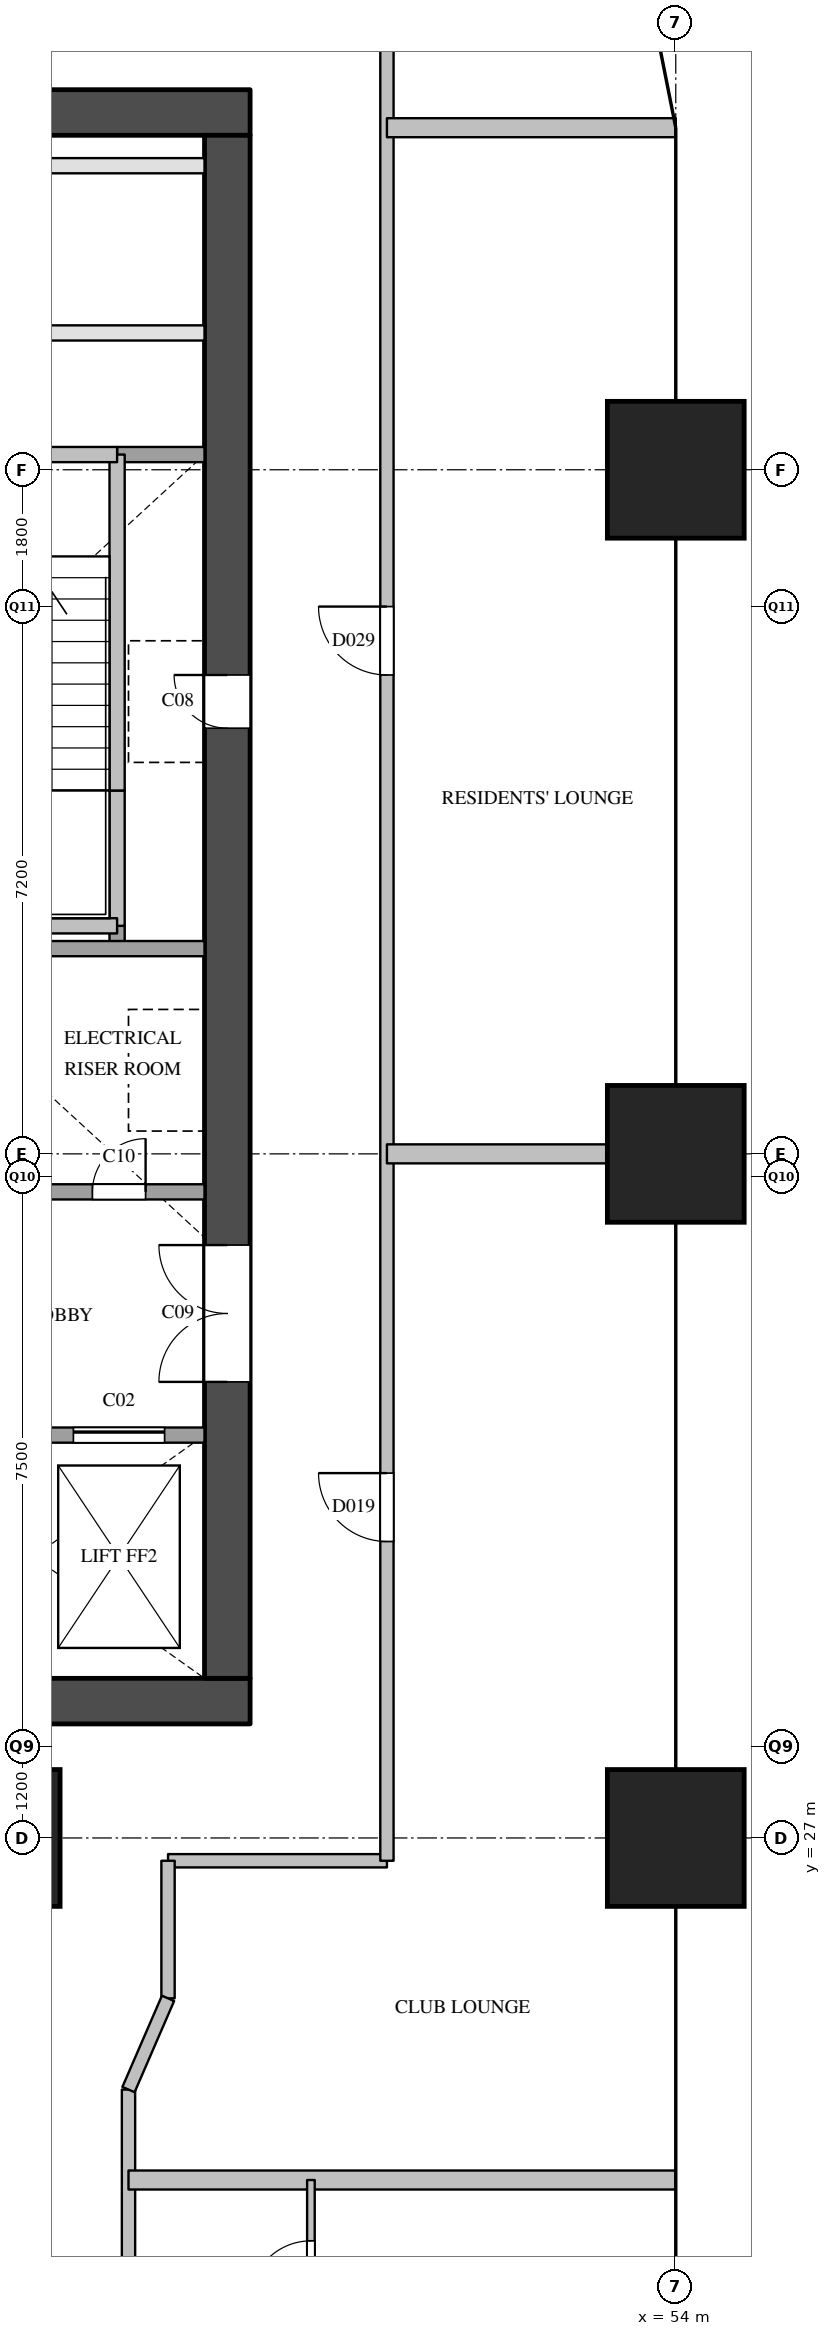
"""IFC4 building model, lengths in metres.
Left out: names, types, materials, properties, quantities, classifications, styles, units other than length and angle.
Written with IfcOpenShell. Run it as: python <this file> out.ifc"""

import sys

from ifc_helpers import new_model, si_unit, direction, frame, frame_2d, origin, origin_2d, place, context, subcontext, project, spatial, rectangle, extrude, element, fill, save


model = new_model("IFC4")
c1 = context("Model", 3, precision=1e-05, world=origin(), true_north=direction((0.0, 1.0)))
c2 = subcontext(c1, "Body", "Model", "MODEL_VIEW")
j1 = project(units=[si_unit("LENGTHUNIT", "METRE"), si_unit("PLANEANGLEUNIT", "RADIAN")], contexts=[c1])
p1 = place(None, origin())
s1 = spatial("IfcSite", under=j1, at=p1, CompositionType="ELEMENT")
p2 = place(p1, origin())
s2 = spatial("IfcBuilding", under=s1, at=p2, CompositionType="ELEMENT")
p3 = place(p2, frame((0.0, 0.0, 96.8)))
s3 = spatial("IfcBuildingStorey", under=s2, at=p3, CompositionType="ELEMENT", Elevation=96.8)
for number, where, z_axis, x_axis in (
    (1, (45.0, 27.0, 0.0), (0.0, 0.0, 1.0), (1.0, 0.0, 0.0)),
    (2, (54.0, 27.0, 0.0), (0.0, 0.0, 1.0), (1.0, 0.0, 0.0)),
    (3, (54.0, 36.0, 0.0), (0.0, 0.0, 1.0), (1.0, 0.0, 0.0)),
    (4, (54.0, 45.0, 0.0), (0.0, 0.0, 1.0), (1.0, 0.0, 0.0)),
):
    element("IfcColumn", number, at=place(p3, frame(where, z_axis=z_axis, x_axis=x_axis)), inside=s3, PredefinedType="COLUMN", context=c2, shape_type="SweptSolid", body=[
        extrude(rectangle(XDim=1.8, YDim=1.8, at=origin_2d()), origin(), (0.0, 0.0, 1.0), 3.8),
    ])
for number, where, z_axis, x_axis in (
    (5, (36.0, 28.8, 0.0), (0.0, 0.0, 1.0), (1.0, 0.0, 0.0)),
    (6, (36.0, 49.7, 0.0), (0.0, 0.0, 1.0), (1.0, 0.0, 0.0)),
):
    element("IfcWall", number, at=place(p3, frame(where, z_axis=z_axis, x_axis=x_axis)), inside=s3, PredefinedType="SHEAR", context=c2, shape_type="SweptSolid", body=[
        extrude(rectangle(XDim=12.4, YDim=0.6, at=frame_2d((6.2, 0.0))), origin(), (0.0, 0.0, 1.0), 3.5),
    ])
p4 = place(p3, frame((48.1, 29.1, 0.0), z_axis=(0.0, 0.0, 1.0), x_axis=(0.0, 1.0, 0.0)))
e7 = element("IfcWall", 7, at=p4, inside=s3, PredefinedType="SHEAR", context=c2, shape_type="SweptSolid", body=[
    extrude(rectangle(XDim=20.3, YDim=0.6, at=frame_2d((10.15, 0.0))), origin(), (0.0, 0.0, 1.0), 3.5),
])
p5 = place(p4, frame((12.5, 0.0, 0.0)))
e8 = element("IfcOpeningElement", 8, at=p5, cuts=e7, PredefinedType="OPENING", context=c2, shape_type="SweptSolid", body=[
    extrude(rectangle(XDim=0.7, YDim=2.1, at=frame_2d((0.35, 1.05))), frame((0.0, 0.31, 0.0), z_axis=(0.0, -1.0, 0.0), x_axis=(1.0, 0.0, 0.0)), (0.0, 0.0, 1.0), 0.62),
])
p6 = place(p4, frame((3.9, 0.0, 0.0)))
e9 = element("IfcOpeningElement", 9, at=p6, cuts=e7, PredefinedType="OPENING", context=c2, shape_type="SweptSolid", body=[
    extrude(rectangle(XDim=1.8, YDim=2.1, at=frame_2d((0.9, 1.05))), frame((0.0, 0.31, 0.0), z_axis=(0.0, -1.0, 0.0), x_axis=(1.0, 0.0, 0.0)), (0.0, 0.0, 1.0), 0.62),
])
p7 = place(p3, frame((46.65, 38.7, 0.0), z_axis=(0.0, 0.0, 1.0), x_axis=(0.0, 1.0, 0.0)))
e10 = element("IfcWall", 10, at=p7, inside=s3, PredefinedType="SOLIDWALL", context=c2, shape_type="SweptSolid", body=[
    extrude(rectangle(XDim=0.3, YDim=0.2, at=frame_2d((0.15, 0.0))), origin(), (0.0, 0.0, 1.0), 3.5),
])
p8 = place(p3, frame((46.65, 39.0, 0.0), z_axis=(0.0, 0.0, 1.0), x_axis=(0.0, 1.0, 0.0)))
e11 = element("IfcWall", 11, at=p8, inside=s3, PredefinedType="SOLIDWALL", context=c2, shape_type="SweptSolid", body=[
    extrude(rectangle(XDim=1.78, YDim=0.2, at=frame_2d((0.89, 0.0))), origin(), (0.0, 0.0, 1.0), 3.5),
])
p9 = place(p3, frame((46.65, 40.78, 0.0), z_axis=(0.0, 0.0, 1.0), x_axis=(0.0, 1.0, 0.0)))
e12 = element("IfcWall", 12, at=p9, inside=s3, PredefinedType="SOLIDWALL", context=c2, shape_type="SweptSolid", body=[
    extrude(rectangle(XDim=4.42, YDim=0.2, at=frame_2d((2.21, 0.0))), origin(), (0.0, 0.0, 1.0), 3.5),
])
p10 = place(p3, frame((36.6, 32.3, 0.0), z_axis=(0.0, 0.0, 1.0), x_axis=(1.0, 0.0, 0.0)))
e13 = element("IfcWall", 13, at=p10, inside=s3, PredefinedType="SOLIDWALL", context=c2, shape_type="SweptSolid", body=[
    extrude(rectangle(XDim=11.2, YDim=0.2, at=frame_2d((5.6, 0.0))), origin(), (0.0, 0.0, 1.0), 3.5),
])
p11 = place(p10, frame((7.225, 0.0, 0.0)))
e14 = element("IfcOpeningElement", 14, at=p11, cuts=e13, PredefinedType="OPENING", context=c2, shape_type="SweptSolid", body=[
    extrude(rectangle(XDim=1.2, YDim=2.1, at=frame_2d((0.6, 1.05))), frame((0.0, 0.11, 0.0), z_axis=(0.0, -1.0, 0.0), x_axis=(1.0, 0.0, 0.0)), (0.0, 0.0, 1.0), 0.22),
])
p12 = place(p10, frame((9.475, 0.0, 0.0)))
e15 = element("IfcOpeningElement", 15, at=p12, cuts=e13, PredefinedType="OPENING", context=c2, shape_type="SweptSolid", body=[
    extrude(rectangle(XDim=1.2, YDim=2.1, at=frame_2d((0.6, 1.05))), frame((0.0, 0.11, 0.0), z_axis=(0.0, -1.0, 0.0), x_axis=(1.0, 0.0, 0.0)), (0.0, 0.0, 1.0), 0.22),
])
p13 = place(p3, frame((43.3, 35.5, 0.0), z_axis=(0.0, 0.0, 1.0), x_axis=(1.0, 0.0, 0.0)))
e16 = element("IfcWall", 16, at=p13, inside=s3, PredefinedType="SOLIDWALL", context=c2, shape_type="SweptSolid", body=[
    extrude(rectangle(XDim=4.5, YDim=0.2, at=frame_2d((2.25, 0.0))), origin(), (0.0, 0.0, 1.0), 3.5),
])
p14 = place(p13, frame((0.525, 0.0, 0.0)))
e17 = element("IfcOpeningElement", 17, at=p14, cuts=e16, PredefinedType="OPENING", context=c2, shape_type="SweptSolid", body=[
    extrude(rectangle(XDim=1.2, YDim=2.1, at=frame_2d((0.6, 1.05))), frame((0.0, 0.11, 0.0), z_axis=(0.0, -1.0, 0.0), x_axis=(1.0, 0.0, 0.0)), (0.0, 0.0, 1.0), 0.22),
])
p15 = place(p13, frame((3.025, 0.0, 0.0)))
e18 = element("IfcOpeningElement", 18, at=p15, cuts=e16, PredefinedType="OPENING", context=c2, shape_type="SweptSolid", body=[
    extrude(rectangle(XDim=0.7, YDim=2.1, at=frame_2d((0.35, 1.05))), frame((0.0, 0.11, 0.0), z_axis=(0.0, -1.0, 0.0), x_axis=(1.0, 0.0, 0.0)), (0.0, 0.0, 1.0), 0.22),
])
p16 = place(p3, frame((43.3, 38.7, 0.0), z_axis=(0.0, 0.0, 1.0), x_axis=(1.0, 0.0, 0.0)))
e19 = element("IfcWall", 19, at=p16, inside=s3, PredefinedType="SOLIDWALL", context=c2, shape_type="SweptSolid", body=[
    extrude(rectangle(XDim=4.5, YDim=0.2, at=frame_2d((2.25, 0.0))), origin(), (0.0, 0.0, 1.0), 3.5),
])
p17 = place(p3, frame((43.4, 39.0, 0.0), z_axis=(0.0, 0.0, 1.0), x_axis=(1.0, 0.0, 0.0)))
e20 = element("IfcWall", 20, at=p17, inside=s3, PredefinedType="SOLIDWALL", context=c2, shape_type="SweptSolid", body=[
    extrude(rectangle(XDim=3.25, YDim=0.2, at=frame_2d((1.625, 0.0))), origin(), (0.0, 0.0, 1.0), 3.5),
])
p18 = place(p3, frame((46.65, 45.2, 0.0), z_axis=(0.0, 0.0, 1.0), x_axis=(1.0, 0.0, 0.0)))
e21 = element("IfcWall", 21, at=p18, inside=s3, PredefinedType="SOLIDWALL", context=c2, shape_type="SweptSolid", body=[
    extrude(rectangle(XDim=1.15, YDim=0.2, at=frame_2d((0.575, 0.0))), origin(), (0.0, 0.0, 1.0), 3.5),
])
p19 = place(p3, frame((36.6, 45.2, 0.0), z_axis=(0.0, 0.0, 1.0), x_axis=(1.0, 0.0, 0.0)))
e22 = element("IfcWall", 22, at=p19, inside=s3, PredefinedType="SOLIDWALL", context=c2, shape_type="SweptSolid", body=[
    extrude(rectangle(XDim=10.05, YDim=0.2, at=frame_2d((5.025, 0.0))), origin(), (0.0, 0.0, 1.0), 3.5),
])
p20 = place(p19, frame((1.125, 0.0, 0.0)))
e23 = element("IfcOpeningElement", 23, at=p20, cuts=e22, PredefinedType="OPENING", context=c2, shape_type="SweptSolid", body=[
    extrude(rectangle(XDim=1.1, YDim=2.1, at=frame_2d((0.55, 1.05))), frame((0.0, 0.11, 0.0), z_axis=(0.0, -1.0, 0.0), x_axis=(1.0, 0.0, 0.0)), (0.0, 0.0, 1.0), 0.22),
])
p21 = place(p19, frame((4.475, 0.0, 0.0)))
e24 = element("IfcOpeningElement", 24, at=p21, cuts=e22, PredefinedType="OPENING", context=c2, shape_type="SweptSolid", body=[
    extrude(rectangle(XDim=1.1, YDim=2.1, at=frame_2d((0.55, 1.05))), frame((0.0, 0.11, 0.0), z_axis=(0.0, -1.0, 0.0), x_axis=(1.0, 0.0, 0.0)), (0.0, 0.0, 1.0), 0.22),
])
p22 = place(p19, frame((7.825, 0.0, 0.0)))
e25 = element("IfcOpeningElement", 25, at=p22, cuts=e22, PredefinedType="OPENING", context=c2, shape_type="SweptSolid", body=[
    extrude(rectangle(XDim=1.1, YDim=2.1, at=frame_2d((0.55, 1.05))), frame((0.0, 0.11, 0.0), z_axis=(0.0, -1.0, 0.0), x_axis=(1.0, 0.0, 0.0)), (0.0, 0.0, 1.0), 0.22),
])
p23 = place(p3, frame((36.6, 46.8, 0.0), z_axis=(0.0, 0.0, 1.0), x_axis=(1.0, 0.0, 0.0)))
e26 = element("IfcWall", 26, at=p23, inside=s3, PredefinedType="PARTITIONING", context=c2, shape_type="SweptSolid", body=[
    extrude(rectangle(XDim=11.2, YDim=0.2, at=frame_2d((5.6, 0.0))), origin(), (0.0, 0.0, 1.0), 3.5),
])
p24 = place(p23, frame((5.15, 0.0, 0.0)))
e27 = element("IfcOpeningElement", 27, at=p24, cuts=e26, PredefinedType="OPENING", context=c2, shape_type="SweptSolid", body=[
    extrude(rectangle(XDim=0.9, YDim=2.1, at=frame_2d((0.45, 1.05))), frame((0.0, 0.11, 0.0), z_axis=(0.0, -1.0, 0.0), x_axis=(1.0, 0.0, 0.0)), (0.0, 0.0, 1.0), 0.22),
])
p25 = place(p3, frame((36.6, 49.0, 0.0), z_axis=(0.0, 0.0, 1.0), x_axis=(1.0, 0.0, 0.0)))
e28 = element("IfcWall", 28, at=p25, inside=s3, PredefinedType="PARTITIONING", context=c2, shape_type="SweptSolid", body=[
    extrude(rectangle(XDim=11.2, YDim=0.2, at=frame_2d((5.6, 0.0))), origin(), (0.0, 0.0, 1.0), 3.5),
])
p26 = place(p3, frame((47.32, 26.7, 0.0), z_axis=(0.0, 0.0, 1.0), x_axis=(1.0, 0.0, 0.0)))
e29 = element("IfcWall", 29, at=p26, inside=s3, PredefinedType="PARTITIONING", context=c2, shape_type="SweptSolid", body=[
    extrude(rectangle(XDim=2.88, YDim=0.175, at=frame_2d((1.44, 0.0))), origin(), (0.0, 0.0, 1.0), 2.5),
])
p27 = place(p3, frame((46.8, 7.2, 0.0), z_axis=(0.0, 0.0, 1.0), x_axis=(0.0, 1.0, 0.0)))
e30 = element("IfcWall", 30, at=p27, inside=s3, PredefinedType="PARTITIONING", context=c2, shape_type="SweptSolid", body=[
    extrude(rectangle(XDim=16.49, YDim=0.175, at=frame_2d((8.245, 0.0))), origin(), (0.0, 0.0, 1.0), 3.5),
])
p28 = place(p27, frame((0.45, 0.0, 0.0)))
e31 = element("IfcOpeningElement", 31, at=p28, cuts=e30, PredefinedType="OPENING", context=c2, shape_type="SweptSolid", body=[
    extrude(rectangle(XDim=0.9, YDim=2.1, at=frame_2d((0.45, 1.05))), frame((0.0, 0.097, 0.0), z_axis=(0.0, -1.0, 0.0), x_axis=(1.0, 0.0, 0.0)), (0.0, 0.0, 1.0), 0.195),
])
p29 = place(p27, frame((4.6, 0.0, 0.0)))
e32 = element("IfcOpeningElement", 32, at=p29, cuts=e30, PredefinedType="OPENING", context=c2, shape_type="SweptSolid", body=[
    extrude(rectangle(XDim=1.0, YDim=2.1, at=frame_2d((0.5, 1.05))), frame((0.0, 0.097, 0.0), z_axis=(0.0, -1.0, 0.0), x_axis=(1.0, 0.0, 0.0)), (0.0, 0.0, 1.0), 0.195),
])
p30 = place(p27, frame((11.35, 0.0, 0.0)))
e33 = element("IfcOpeningElement", 33, at=p30, cuts=e30, PredefinedType="OPENING", context=c2, shape_type="SweptSolid", body=[
    extrude(rectangle(XDim=1.0, YDim=2.1, at=frame_2d((0.5, 1.05))), frame((0.0, 0.097, 0.0), z_axis=(0.0, -1.0, 0.0), x_axis=(1.0, 0.0, 0.0)), (0.0, 0.0, 1.0), 0.195),
])
p31 = place(p3, frame((47.32, 24.89, 0.0), z_axis=(0.0, 0.0, 1.0), x_axis=(0.0, 1.0, 0.0)))
e34 = element("IfcWall", 34, at=p31, inside=s3, PredefinedType="PARTITIONING", context=c2, shape_type="SweptSolid", body=[
    extrude(rectangle(XDim=1.81, YDim=0.175, at=frame_2d((0.905, 0.0))), origin(), (0.0, 0.0, 1.0), 2.5),
])
p32 = place(p3, frame((50.2, 26.7, 0.0), z_axis=(0.0, 0.0, 1.0), x_axis=(0.0, 1.0, 0.0)))
e35 = element("IfcWall", 35, at=p32, inside=s3, PredefinedType="PARTITIONING", context=c2, shape_type="SweptSolid", body=[
    extrude(rectangle(XDim=25.1, YDim=0.175, at=frame_2d((12.55, 0.0))), origin(), (0.0, 0.0, 1.0), 2.5),
])
p33 = place(p32, frame((4.2, 0.0, 0.0)))
e36 = element("IfcOpeningElement", 36, at=p33, cuts=e35, PredefinedType="OPENING", context=c2, shape_type="SweptSolid", body=[
    extrude(rectangle(XDim=0.9, YDim=2.1, at=frame_2d((0.45, 1.05))), frame((0.0, 0.097, 0.0), z_axis=(0.0, -1.0, 0.0), x_axis=(1.0, 0.0, 0.0)), (0.0, 0.0, 1.0), 0.195),
])
p34 = place(p32, frame((15.6, 0.0, 0.0)))
e37 = element("IfcOpeningElement", 37, at=p34, cuts=e35, PredefinedType="OPENING", context=c2, shape_type="SweptSolid", body=[
    extrude(rectangle(XDim=0.9, YDim=2.1, at=frame_2d((0.45, 1.05))), frame((0.0, 0.097, 0.0), z_axis=(0.0, -1.0, 0.0), x_axis=(1.0, 0.0, 0.0)), (0.0, 0.0, 1.0), 0.195),
])
p35 = place(p3, frame((46.8, 22.5, 0.0), z_axis=(0.0, 0.0, 1.0), x_axis=(1.0, 0.0, 0.0)))
e38 = element("IfcWall", 38, at=p35, inside=s3, PredefinedType="PARTITIONING", context=c2, shape_type="SweptSolid", body=[
    extrude(rectangle(XDim=7.2, YDim=0.25, at=frame_2d((3.6, 0.0))), origin(), (0.0, 0.0, 1.0), 2.5),
])
p36 = place(p3, frame((50.2, 36.0, 0.0), z_axis=(0.0, 0.0, 1.0), x_axis=(1.0, 0.0, 0.0)))
e39 = element("IfcWall", 39, at=p36, inside=s3, PredefinedType="PARTITIONING", context=c2, shape_type="SweptSolid", body=[
    extrude(rectangle(XDim=3.8, YDim=0.25, at=frame_2d((1.9, 0.0))), origin(), (0.0, 0.0, 1.0), 3.5),
])
p37 = place(p3, frame((50.2, 49.5, 0.0), z_axis=(0.0, 0.0, 1.0), x_axis=(1.0, 0.0, 0.0)))
e40 = element("IfcWall", 40, at=p37, inside=s3, PredefinedType="PARTITIONING", context=c2, shape_type="SweptSolid", body=[
    extrude(rectangle(XDim=3.8, YDim=0.25, at=frame_2d((1.9, 0.0))), origin(), (0.0, 0.0, 1.0), 2.5),
])
p38 = place(p3, frame((49.2, 20.1, 0.0), z_axis=(0.0, 0.0, 1.0), x_axis=(0.0, 1.0, 0.0)))
e41 = element("IfcWall", 41, at=p38, inside=s3, PredefinedType="PARTITIONING", context=c2, shape_type="SweptSolid", body=[
    extrude(rectangle(XDim=2.4, YDim=0.1, at=frame_2d((1.2, 0.0))), origin(), (0.0, 0.0, 1.0), 3.5),
])
p39 = place(p38, frame((0.8, 0.0, 0.0)))
e42 = element("IfcOpeningElement", 42, at=p39, cuts=e41, PredefinedType="OPENING", context=c2, shape_type="SweptSolid", body=[
    extrude(rectangle(XDim=0.8, YDim=2.1, at=frame_2d((0.4, 1.05))), frame((0.0, 0.06, 0.0), z_axis=(0.0, -1.0, 0.0), x_axis=(1.0, 0.0, 0.0)), (0.0, 0.0, 1.0), 0.12),
])
p40 = place(p3, frame((47.32, 24.89, 0.0), z_axis=(0.0, 0.0, 1.0), x_axis=(-0.397633632391, -0.917544273804, 0.0)))
e43 = element("IfcWall", 43, at=p40, inside=s3, PredefinedType="PARTITIONING", context=c2, shape_type="SweptSolid", body=[
    extrude(rectangle(XDim=1.308, YDim=0.175, at=frame_2d((0.654, 0.0))), origin(), (0.0, 0.0, 1.0), 3.5),
])
p41 = place(p12, origin())
e44 = element("IfcDoor", 44, at=p41, inside=s3, OperationType="SLIDING_TO_LEFT", PredefinedType="DOOR", context=c2, shape_type="SweptSolid", body=[
    extrude(rectangle(XDim=1.2, YDim=2.1, at=frame_2d((0.6, 1.05))), frame((0.0, 0.025, 0.0), z_axis=(0.0, -1.0, 0.0), x_axis=(1.0, 0.0, 0.0)), (0.0, 0.0, 1.0), 0.05),
])
fill(e15, e44)
p42 = place(p5, origin())
e45 = element("IfcDoor", 45, at=p42, inside=s3, OperationType="SINGLE_SWING_RIGHT", PredefinedType="DOOR", context=c2, shape_type="SweptSolid", body=[
    extrude(rectangle(XDim=0.7, YDim=2.1, at=frame_2d((0.35, 1.05))), frame((0.0, 0.025, 0.0), z_axis=(0.0, -1.0, 0.0), x_axis=(1.0, 0.0, 0.0)), (0.0, 0.0, 1.0), 0.05),
])
fill(e8, e45)
p43 = place(p6, origin())
e46 = element("IfcDoor", 46, at=p43, inside=s3, OperationType="DOUBLE_DOOR_SINGLE_SWING", PredefinedType="DOOR", context=c2, shape_type="SweptSolid", body=[
    extrude(rectangle(XDim=1.8, YDim=2.1, at=frame_2d((0.9, 1.05))), frame((0.0, 0.025, 0.0), z_axis=(0.0, -1.0, 0.0), x_axis=(1.0, 0.0, 0.0)), (0.0, 0.0, 1.0), 0.05),
])
fill(e9, e46)
p44 = place(p15, origin())
e47 = element("IfcDoor", 47, at=p44, inside=s3, OperationType="SINGLE_SWING_RIGHT", PredefinedType="DOOR", context=c2, shape_type="SweptSolid", body=[
    extrude(rectangle(XDim=0.7, YDim=2.1, at=frame_2d((0.35, 1.05))), frame((0.0, 0.025, 0.0), z_axis=(0.0, -1.0, 0.0), x_axis=(1.0, 0.0, 0.0)), (0.0, 0.0, 1.0), 0.05),
])
fill(e18, e47)
p45 = place(p39, origin())
e48 = element("IfcDoor", 48, at=p45, inside=s3, OperationType="SINGLE_SWING_LEFT", PredefinedType="DOOR", context=c2, shape_type="SweptSolid", body=[
    extrude(rectangle(XDim=0.8, YDim=2.1, at=frame_2d((0.4, 1.05))), frame((0.0, 0.025, 0.0), z_axis=(0.0, -1.0, 0.0), x_axis=(1.0, 0.0, 0.0)), (0.0, 0.0, 1.0), 0.05),
])
fill(e42, e48)
p46 = place(p33, origin())
e49 = element("IfcDoor", 49, at=p46, inside=s3, OperationType="SINGLE_SWING_RIGHT", PredefinedType="DOOR", context=c2, shape_type="SweptSolid", body=[
    extrude(rectangle(XDim=0.9, YDim=2.1, at=frame_2d((0.45, 1.05))), frame((0.0, 0.025, 0.0), z_axis=(0.0, -1.0, 0.0), x_axis=(1.0, 0.0, 0.0)), (0.0, 0.0, 1.0), 0.05),
])
fill(e36, e49)
p47 = place(p34, origin())
e50 = element("IfcDoor", 50, at=p47, inside=s3, OperationType="SINGLE_SWING_RIGHT", PredefinedType="DOOR", context=c2, shape_type="SweptSolid", body=[
    extrude(rectangle(XDim=0.9, YDim=2.1, at=frame_2d((0.45, 1.05))), frame((0.0, 0.025, 0.0), z_axis=(0.0, -1.0, 0.0), x_axis=(1.0, 0.0, 0.0)), (0.0, 0.0, 1.0), 0.05),
])
fill(e37, e50)
save(model, sys.argv[1])
